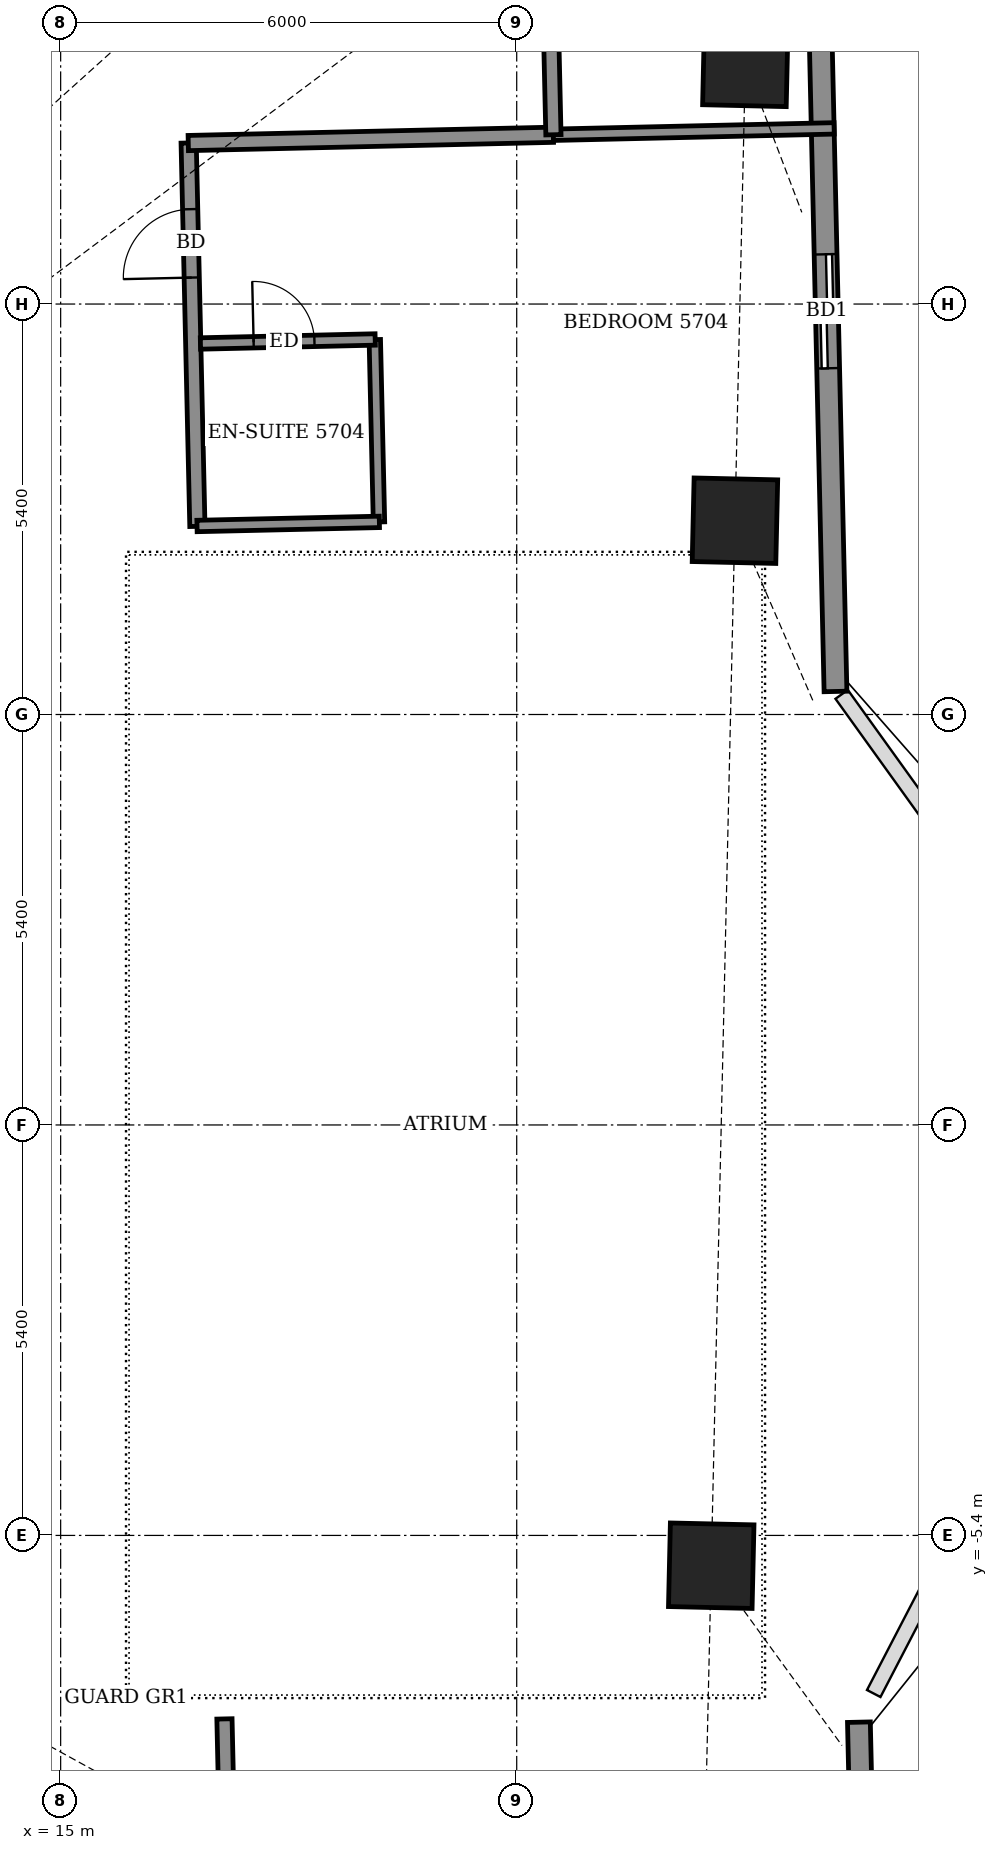
"""IFC4 building model, lengths in metres.
Left out: names, types, materials, properties, quantities, classifications, styles, units other than length and angle.
Written with IfcOpenShell. Run it as: python <this file> out.ifc"""

import sys

from ifc_helpers import new_model, si_unit, direction, frame, frame_2d, origin, origin_2d, place, context, subcontext, project, spatial, rectangle, extrude, element, fill, save


model = new_model("IFC4")
c1 = context("Model", 3, precision=1e-05, world=origin(), true_north=direction((0.0, 1.0)))
c2 = subcontext(c1, "Body", "Model", "MODEL_VIEW")
j1 = project(units=[si_unit("LENGTHUNIT", "METRE"), si_unit("PLANEANGLEUNIT", "RADIAN")], contexts=[c1])
p1 = place(None, origin())
s1 = spatial("IfcSite", under=j1, at=p1, CompositionType="ELEMENT")
p2 = place(p1, origin())
s2 = spatial("IfcBuilding", under=s1, at=p2, CompositionType="ELEMENT")
p3 = place(p2, frame((0.0, 0.0, 226.5)))
s3 = spatial("IfcBuildingStorey", under=s2, at=p3, CompositionType="ELEMENT", Elevation=226.5)
for number, where, z_axis, x_axis in (
    (1, (23.559, -5.799, -0.55), (0.0, 0.0, 1.0), (0.023, 1.0, 0.0)),
    (2, (23.871, 7.949, -0.55), (0.0, 0.0, 1.0), (0.023, 1.0, 0.0)),
    (3, (24.008, 13.959, -0.55), (0.0, 0.0, 1.0), (0.023, 1.0, 0.0)),
):
    element("IfcColumn", number, at=place(p3, frame(where, z_axis=z_axis, x_axis=x_axis)), inside=s3, PredefinedType="COLUMN", context=c2, shape_type="SweptSolid", body=[
        extrude(rectangle(XDim=1.1, YDim=1.1, at=origin_2d()), origin(), (0.0, 0.0, 1.0), 4.6),
    ])
p4 = place(p3, frame((25.77, -19.684, 0.0), z_axis=(0.0, 0.0, 1.0), x_axis=(-0.022659525999, 0.999743239978, 0.0)))
e4 = element("IfcWall", 4, at=p4, inside=s3, PredefinedType="SOLIDWALL", context=c2, shape_type="SweptSolid", body=[
    extrude(rectangle(XDim=11.83, YDim=0.3, at=frame_2d((5.915, 0.0))), origin(), (0.0, 0.0, 1.0), 2.85),
])
p5 = place(p4, frame((5.022, 0.0, 0.0)))
e5 = element("IfcOpeningElement", 5, at=p5, cuts=e4, PredefinedType="OPENING", context=c2, shape_type="SweptSolid", body=[
    extrude(rectangle(XDim=1.5, YDim=2.4, at=frame_2d((0.75, 1.2))), frame((0.0, 0.16, 0.0), z_axis=(0.0, -1.0, 0.0), x_axis=(1.0, 0.0, 0.0)), (0.0, 0.0, 1.0), 0.32),
])
p6 = place(p4, frame((8.55, 0.0, 0.9)))
e6 = element("IfcOpeningElement", 6, at=p6, cuts=e4, PredefinedType="OPENING", context=c2, shape_type="SweptSolid", body=[
    extrude(rectangle(XDim=2.4, YDim=1.5, at=frame_2d((1.2, 0.75))), frame((0.0, 0.16, 0.0), z_axis=(0.0, -1.0, 0.0), x_axis=(1.0, 0.0, 0.0)), (0.0, 0.0, 1.0), 0.32),
])
p7 = place(p3, frame((25.194, 5.703, 0.0), z_axis=(0.0, 0.0, 1.0), x_axis=(-0.022718397506, 0.999741903901, 0.0)))
e7 = element("IfcWall", 7, at=p7, inside=s3, PredefinedType="SOLIDWALL", context=c2, shape_type="SweptSolid", body=[
    extrude(rectangle(XDim=12.906, YDim=0.3, at=frame_2d((6.453, 0.0))), origin(), (0.0, 0.0, 1.0), 2.55),
])
p8 = place(p7, frame((4.253, 0.0, 0.0)))
e8 = element("IfcOpeningElement", 8, at=p8, cuts=e7, PredefinedType="OPENING", context=c2, shape_type="SweptSolid", body=[
    extrude(rectangle(XDim=1.5, YDim=2.4, at=frame_2d((0.75, 1.2))), frame((0.0, 0.16, 0.0), z_axis=(0.0, -1.0, 0.0), x_axis=(1.0, 0.0, 0.0)), (0.0, 0.0, 1.0), 0.32),
])
p9 = place(p7, frame((9.781, 0.0, 0.9)))
e9 = element("IfcOpeningElement", 9, at=p9, cuts=e7, PredefinedType="OPENING", context=c2, shape_type="SweptSolid", body=[
    extrude(rectangle(XDim=2.4, YDim=1.5, at=frame_2d((1.2, 0.75))), frame((0.0, 0.16, 0.0), z_axis=(0.0, -1.0, 0.0), x_axis=(1.0, 0.0, 0.0)), (0.0, 0.0, 1.0), 0.32),
])
p10 = place(p3, frame((17.253, -12.149, 0.0), z_axis=(0.0, 0.0, 1.0), x_axis=(-0.022578158225, 0.999745080894, 0.0)))
e10 = element("IfcWall", 10, at=p10, inside=s3, PredefinedType="PARTITIONING", context=c2, shape_type="SweptSolid", body=[
    extrude(rectangle(XDim=4.336, YDim=0.2, at=frame_2d((2.168, 0.0))), origin(), (0.0, 0.0, 1.0), 2.85),
])
p11 = place(p10, frame((1.566, 0.0, 0.0)))
e11 = element("IfcOpeningElement", 11, at=p11, cuts=e10, PredefinedType="OPENING", context=c2, shape_type="SweptSolid", body=[
    extrude(rectangle(XDim=1.0, YDim=2.1, at=frame_2d((0.5, 1.05))), frame((0.0, 0.11, 0.0), z_axis=(0.0, -1.0, 0.0), x_axis=(1.0, 0.0, 0.0)), (0.0, 0.0, 1.0), 0.22),
])
p12 = place(p3, frame((16.799, 7.875, 0.0), z_axis=(0.0, 0.0, 1.0), x_axis=(-0.022791754614, 0.999740234222, 0.0)))
e12 = element("IfcWall", 12, at=p12, inside=s3, PredefinedType="PARTITIONING", context=c2, shape_type="SweptSolid", body=[
    extrude(rectangle(XDim=5.045, YDim=0.2, at=frame_2d((2.522, 0.0))), origin(), (0.0, 0.0, 1.0), 2.85),
])
p13 = place(p12, frame((3.274, 0.0, 0.0)))
e13 = element("IfcOpeningElement", 13, at=p13, cuts=e12, PredefinedType="OPENING", context=c2, shape_type="SweptSolid", body=[
    extrude(rectangle(XDim=0.9, YDim=2.1, at=frame_2d((0.45, 1.05))), frame((0.0, 0.11, 0.0), z_axis=(0.0, -1.0, 0.0), x_axis=(1.0, 0.0, 0.0)), (0.0, 0.0, 1.0), 0.22),
])
p14 = place(p3, frame((19.188, 7.933, 0.0), z_axis=(0.0, 0.0, 1.0), x_axis=(-0.022892431828, 0.999737933943, 0.0)))
e14 = element("IfcWall", 14, at=p14, inside=s3, PredefinedType="PARTITIONING", context=c2, shape_type="SweptSolid", body=[
    extrude(rectangle(XDim=2.4, YDim=0.15, at=frame_2d((1.2, 0.0))), origin(), (0.0, 0.0, 1.0), 4.05),
])
p15 = place(p3, frame((16.794, 7.88, 0.0), z_axis=(0.0, 0.0, 1.0), x_axis=(0.999744925027, 0.022585058854, 0.0)))
e15 = element("IfcWall", 15, at=p15, inside=s3, PredefinedType="PARTITIONING", context=c2, shape_type="SweptSolid", body=[
    extrude(rectangle(XDim=2.4, YDim=0.15, at=frame_2d((1.2, 0.0))), origin(), (0.0, 0.0, 1.0), 4.05),
])
p16 = place(p3, frame((16.839, 10.281, 0.0), z_axis=(0.0, 0.0, 1.0), x_axis=(0.999734549456, 0.023039761813, 0.0)))
e16 = element("IfcWall", 16, at=p16, inside=s3, PredefinedType="PARTITIONING", context=c2, shape_type="SweptSolid", body=[
    extrude(rectangle(XDim=2.3, YDim=0.15, at=frame_2d((1.15, 0.0))), origin(), (0.0, 0.0, 1.0), 4.05),
])
p17 = place(p16, frame((0.7, 0.0, 0.0)))
e17 = element("IfcOpeningElement", 17, at=p17, cuts=e16, PredefinedType="OPENING", context=c2, shape_type="SweptSolid", body=[
    extrude(rectangle(XDim=0.8, YDim=2.1, at=frame_2d((0.4, 1.05))), frame((0.0, 0.085, 0.0), z_axis=(0.0, -1.0, 0.0), x_axis=(1.0, 0.0, 0.0)), (0.0, 0.0, 1.0), 0.17),
])
p18 = place(p3, frame((16.679, 12.918, 0.0), z_axis=(0.0, 0.0, 1.0), x_axis=(0.999741966705, 0.022715633565, 0.0)))
e18 = element("IfcWall", 18, at=p18, inside=s3, PredefinedType="PARTITIONING", context=c2, shape_type="SweptSolid", body=[
    extrude(rectangle(XDim=4.804, YDim=0.2, at=frame_2d((2.402, 0.0))), origin(), (0.0, 0.0, 1.0), 2.85),
])
p19 = place(p3, frame((21.482, 13.027, 0.0), z_axis=(0.0, 0.0, 1.0), x_axis=(0.999741664963, 0.022728909705, 0.0)))
e19 = element("IfcWall", 19, at=p19, inside=s3, PredefinedType="PARTITIONING", context=c2, shape_type="SweptSolid", body=[
    extrude(rectangle(XDim=3.695, YDim=0.15, at=frame_2d((1.848, 0.0))), origin(), (0.0, 0.0, 1.0), 2.55),
])
p20 = place(p3, frame((21.483, 13.027, 0.0), z_axis=(0.0, 0.0, 1.0), x_axis=(-0.022617910375, 0.999744182344, 0.0)))
e20 = element("IfcWall", 20, at=p20, inside=s3, PredefinedType="PARTITIONING", context=c2, shape_type="SweptSolid", body=[
    extrude(rectangle(XDim=1.5, YDim=0.2, at=frame_2d((0.75, 0.0))), origin(), (0.0, 0.0, 1.0), 4.05),
])
p21 = place(p3, frame((-27.652, 13.413, 0.0), z_axis=(0.0, 0.0, 1.0), x_axis=(0.999742712492, 0.022682786863, 0.0)))
e21 = element("IfcWall", 21, at=p21, inside=s3, PredefinedType="PARTITIONING", context=c2, shape_type="SweptSolid", body=[
    extrude(rectangle(XDim=49.113, YDim=0.2, at=frame_2d((24.556, 0.0))), origin(), (0.0, 0.0, 1.0), 2.45),
])
p22 = place(p21, frame((47.529, 0.0, 0.0)))
e22 = element("IfcOpeningElement", 22, at=p22, cuts=e21, PredefinedType="OPENING", context=c2, shape_type="SweptSolid", body=[
    extrude(rectangle(XDim=1.0, YDim=2.1, at=frame_2d((0.5, 1.05))), frame((0.0, 0.11, 0.0), z_axis=(0.0, -1.0, 0.0), x_axis=(1.0, 0.0, 0.0)), (0.0, 0.0, 1.0), 0.22),
])
p23 = place(p21, frame((41.6, 0.0, 0.0)))
e23 = element("IfcOpeningElement", 23, at=p23, cuts=e21, PredefinedType="OPENING", context=c2, shape_type="SweptSolid", body=[
    extrude(rectangle(XDim=0.9, YDim=2.1, at=frame_2d((0.45, 1.05))), frame((0.0, 0.11, 0.0), z_axis=(0.0, -1.0, 0.0), x_axis=(1.0, 0.0, 0.0)), (0.0, 0.0, 1.0), 0.22),
])
p24 = place(p21, frame((37.85, 0.0, 0.0)))
e24 = element("IfcOpeningElement", 24, at=p24, cuts=e21, PredefinedType="OPENING", context=c2, shape_type="SweptSolid", body=[
    extrude(rectangle(XDim=1.0, YDim=2.1, at=frame_2d((0.5, 1.05))), frame((0.0, 0.11, 0.0), z_axis=(0.0, -1.0, 0.0), x_axis=(1.0, 0.0, 0.0)), (0.0, 0.0, 1.0), 0.22),
])
p25 = place(p21, frame((34.1, 0.0, 0.0)))
e25 = element("IfcOpeningElement", 25, at=p25, cuts=e21, PredefinedType="OPENING", context=c2, shape_type="SweptSolid", body=[
    extrude(rectangle(XDim=0.9, YDim=2.1, at=frame_2d((0.45, 1.05))), frame((0.0, 0.11, 0.0), z_axis=(0.0, -1.0, 0.0), x_axis=(1.0, 0.0, 0.0)), (0.0, 0.0, 1.0), 0.22),
])
p26 = place(p21, frame((28.525, 0.0, 0.0)))
e26 = element("IfcOpeningElement", 26, at=p26, cuts=e21, PredefinedType="OPENING", context=c2, shape_type="SweptSolid", body=[
    extrude(rectangle(XDim=1.0, YDim=2.1, at=frame_2d((0.5, 1.05))), frame((0.0, 0.11, 0.0), z_axis=(0.0, -1.0, 0.0), x_axis=(1.0, 0.0, 0.0)), (0.0, 0.0, 1.0), 0.22),
])
p27 = place(p21, frame((31.6, 0.0, 0.0)))
e27 = element("IfcOpeningElement", 27, at=p27, cuts=e21, PredefinedType="OPENING", context=c2, shape_type="SweptSolid", body=[
    extrude(rectangle(XDim=0.9, YDim=2.1, at=frame_2d((0.45, 1.05))), frame((0.0, 0.11, 0.0), z_axis=(0.0, -1.0, 0.0), x_axis=(1.0, 0.0, 0.0)), (0.0, 0.0, 1.0), 0.22),
])
p28 = place(p21, frame((25.45, 0.0, 0.0)))
e28 = element("IfcOpeningElement", 28, at=p28, cuts=e21, PredefinedType="OPENING", context=c2, shape_type="SweptSolid", body=[
    extrude(rectangle(XDim=0.9, YDim=2.1, at=frame_2d((0.45, 1.05))), frame((0.0, 0.11, 0.0), z_axis=(0.0, -1.0, 0.0), x_axis=(1.0, 0.0, 0.0)), (0.0, 0.0, 1.0), 0.22),
])
p29 = place(p21, frame((18.05, 0.0, 0.0)))
e29 = element("IfcOpeningElement", 29, at=p29, cuts=e21, PredefinedType="OPENING", context=c2, shape_type="SweptSolid", body=[
    extrude(rectangle(XDim=0.9, YDim=2.1, at=frame_2d((0.45, 1.05))), frame((0.0, 0.11, 0.0), z_axis=(0.0, -1.0, 0.0), x_axis=(1.0, 0.0, 0.0)), (0.0, 0.0, 1.0), 0.22),
])
p30 = place(p21, frame((14.975, 0.0, 0.0)))
e30 = element("IfcOpeningElement", 30, at=p30, cuts=e21, PredefinedType="OPENING", context=c2, shape_type="SweptSolid", body=[
    extrude(rectangle(XDim=1.0, YDim=2.1, at=frame_2d((0.5, 1.05))), frame((0.0, 0.11, 0.0), z_axis=(0.0, -1.0, 0.0), x_axis=(1.0, 0.0, 0.0)), (0.0, 0.0, 1.0), 0.22),
])
p31 = place(p21, frame((12.0, 0.0, 0.0)))
e31 = element("IfcOpeningElement", 31, at=p31, cuts=e21, PredefinedType="OPENING", context=c2, shape_type="SweptSolid", body=[
    extrude(rectangle(XDim=0.9, YDim=2.1, at=frame_2d((0.45, 1.05))), frame((0.0, 0.11, 0.0), z_axis=(0.0, -1.0, 0.0), x_axis=(1.0, 0.0, 0.0)), (0.0, 0.0, 1.0), 0.22),
])
p32 = place(p21, frame((5.354, 0.0, 0.0)))
e32 = element("IfcOpeningElement", 32, at=p32, cuts=e21, PredefinedType="OPENING", context=c2, shape_type="SweptSolid", body=[
    extrude(rectangle(XDim=1.0, YDim=2.1, at=frame_2d((0.5, 1.05))), frame((0.0, 0.11, 0.0), z_axis=(0.0, -1.0, 0.0), x_axis=(1.0, 0.0, 0.0)), (0.0, 0.0, 1.0), 0.22),
])
p33 = place(p8, origin())
e33 = element("IfcDoor", 33, at=p33, inside=s3, OperationType="SLIDING_TO_LEFT", PredefinedType="DOOR", context=c2, shape_type="SweptSolid", body=[
    extrude(rectangle(XDim=1.5, YDim=2.4, at=frame_2d((0.75, 1.2))), frame((0.0, 0.025, 0.0), z_axis=(0.0, -1.0, 0.0), x_axis=(1.0, 0.0, 0.0)), (0.0, 0.0, 1.0), 0.05),
])
fill(e8, e33)
p34 = place(p13, origin())
e34 = element("IfcDoor", 34, at=p34, inside=s3, OperationType="SINGLE_SWING_RIGHT", PredefinedType="DOOR", context=c2, shape_type="SweptSolid", body=[
    extrude(rectangle(XDim=0.9, YDim=2.1, at=frame_2d((0.45, 1.05))), frame((0.0, 0.025, 0.0), z_axis=(0.0, -1.0, 0.0), x_axis=(1.0, 0.0, 0.0)), (0.0, 0.0, 1.0), 0.05),
])
fill(e13, e34)
p35 = place(p17, origin())
e35 = element("IfcDoor", 35, at=p35, inside=s3, OperationType="SINGLE_SWING_RIGHT", PredefinedType="DOOR", context=c2, shape_type="SweptSolid", body=[
    extrude(rectangle(XDim=0.8, YDim=2.1, at=frame_2d((0.4, 1.05))), frame((0.0, 0.025, 0.0), z_axis=(0.0, -1.0, 0.0), x_axis=(1.0, 0.0, 0.0)), (0.0, 0.0, 1.0), 0.05),
])
fill(e17, e35)
save(model, sys.argv[1])
